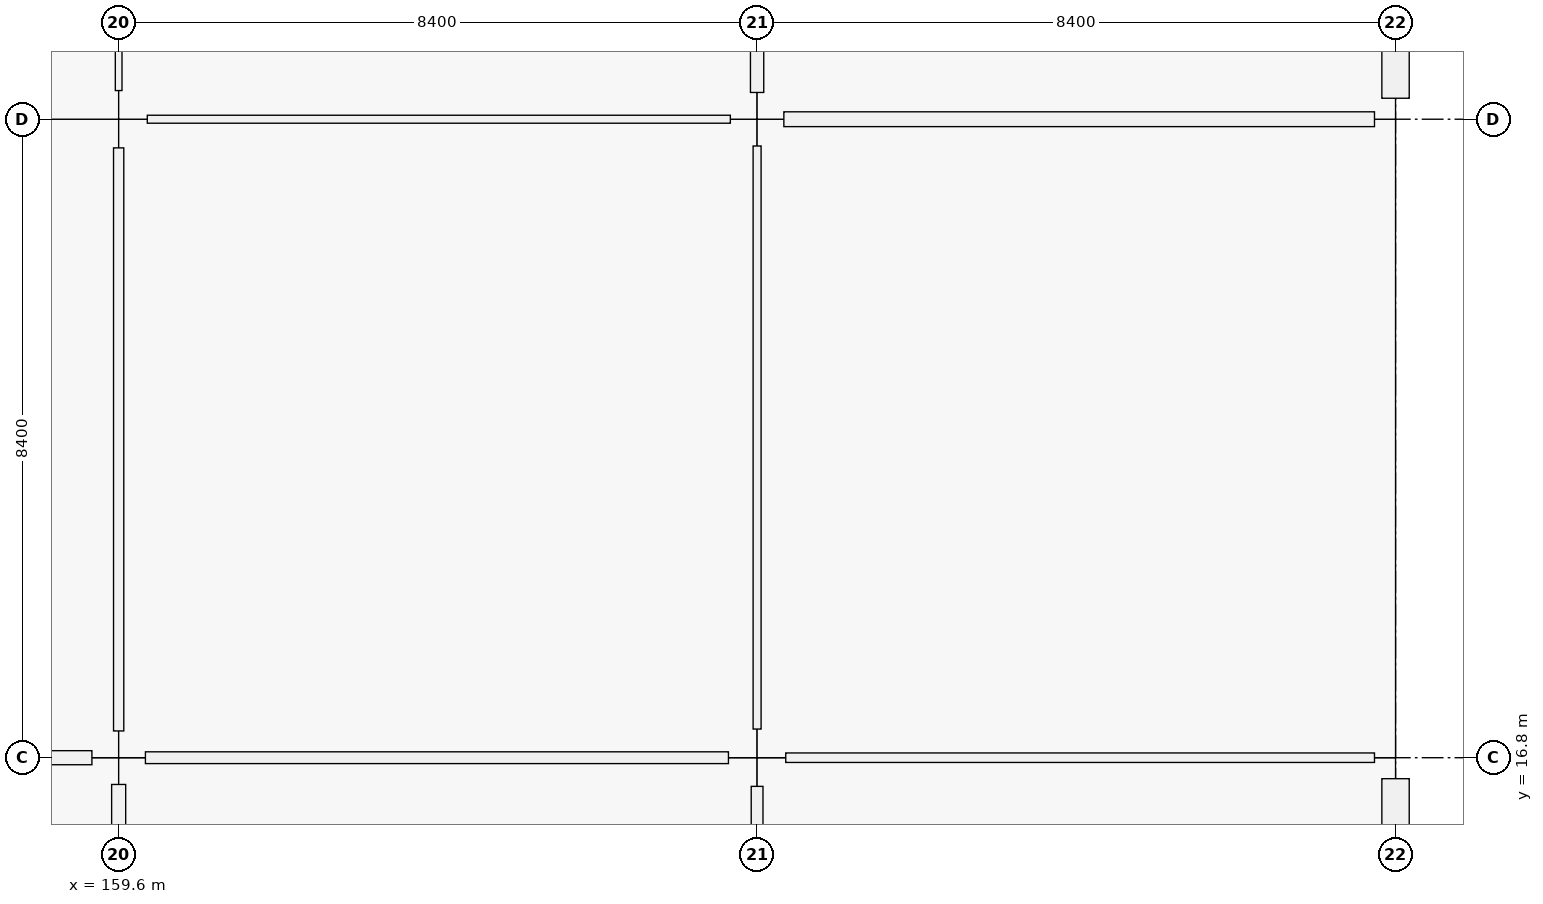
"""IFC4 building model, lengths in metres.
Left out: names, types, materials, properties, quantities, classifications, styles, units other than length and angle.
Written with IfcOpenShell. Run it as: python <this file> out.ifc"""

import sys

from ifc_helpers import new_model, si_unit, direction, frame, frame_2d, origin, origin_2d, place, context, subcontext, project, spatial, rectangle, extrude, element, fill, save


model = new_model("IFC4")
c1 = context("Model", 3, precision=1e-05, world=origin(), true_north=direction((0.0, 1.0)))
c2 = subcontext(c1, "Body", "Model", "MODEL_VIEW")
j1 = project(units=[si_unit("LENGTHUNIT", "METRE"), si_unit("PLANEANGLEUNIT", "RADIAN")], contexts=[c1])
p1 = place(None, origin())
s1 = spatial("IfcSite", under=j1, at=p1, CompositionType="ELEMENT")
p2 = place(p1, origin())
s2 = spatial("IfcBuilding", under=s1, at=p2, CompositionType="ELEMENT")
p3 = place(p2, frame((0.0, 0.0, 5.76)))
s3 = spatial("IfcBuildingStorey", under=s2, at=p3, CompositionType="ELEMENT", Elevation=5.76)
p4 = place(p3, frame((159.6, 16.8, 0.0), z_axis=(0.0, 0.0, 1.0), x_axis=(1.0, 0.0, 0.0)))
e1 = element("IfcColumn", 1, at=p4, inside=s3, PredefinedType="COLUMN", context=c2, shape_type="SweptSolid", body=[
    extrude(rectangle(XDim=0.7, YDim=0.7, at=origin_2d()), origin(), (0.0, 0.0, 1.0), 4.5),
])
for number, where, z_axis, x_axis in (
    (2, (159.6, 25.2, 0.0), (0.0, 0.0, 1.0), (1.0, 0.0, 0.0)),
    (3, (168.0, 16.8, 0.0), (0.0, 0.0, 1.0), (1.0, 0.0, 0.0)),
):
    element("IfcColumn", number, at=place(p3, frame(where, z_axis=z_axis, x_axis=x_axis)), inside=s3, PredefinedType="COLUMN", context=c2, shape_type="SweptSolid", body=[
        extrude(rectangle(XDim=0.75, YDim=0.75, at=origin_2d()), origin(), (0.0, 0.0, 1.0), 4.5),
    ])
p5 = place(p3, frame((168.0, 25.2, 0.0), z_axis=(0.0, 0.0, 1.0), x_axis=(1.0, 0.0, 0.0)))
e4 = element("IfcColumn", 4, at=p5, inside=s3, PredefinedType="COLUMN", context=c2, shape_type="SweptSolid", body=[
    extrude(rectangle(XDim=0.7, YDim=0.7, at=origin_2d()), origin(), (0.0, 0.0, 1.0), 4.5),
])
for number, where, z_axis, x_axis in (
    (5, (176.4, 16.8, 0.0), (0.0, 0.0, 1.0), (1.0, 0.0, 0.0)),
    (6, (176.4, 25.2, 0.0), (0.0, 0.0, 1.0), (1.0, 0.0, 0.0)),
):
    element("IfcColumn", number, at=place(p3, frame(where, z_axis=z_axis, x_axis=x_axis)), inside=s3, PredefinedType="COLUMN", context=c2, shape_type="SweptSolid", body=[
        extrude(rectangle(XDim=0.55, YDim=0.55, at=origin_2d()), origin(), (0.0, 0.0, 1.0), 4.2),
    ])
p6 = place(p3, frame((176.4, 16.524, 0.0), z_axis=(0.0, 0.0, 1.0), x_axis=(0.0, -1.0, 0.0)))
e7 = element("IfcWall", 7, at=p6, inside=s3, PredefinedType="SOLIDWALL", context=c2, shape_type="SweptSolid", body=[
    extrude(rectangle(XDim=7.848, YDim=0.36, at=frame_2d((3.924, 0.0))), origin(), (0.0, 0.0, 1.0), 3.4),
])
p7 = place(p6, frame((2.649, 0.0, 0.9)))
e8 = element("IfcOpeningElement", 8, at=p7, cuts=e7, PredefinedType="OPENING", context=c2, shape_type="SweptSolid", body=[
    extrude(rectangle(XDim=2.55, YDim=1.95, at=frame_2d((1.275, 0.975))), frame((0.0, 0.18, 0.0), z_axis=(0.0, -1.0, 0.0), x_axis=(1.0, 0.0, 0.0)), (0.0, 0.0, 1.0), 0.36),
])
p8 = place(p3, frame((176.4, 33.324, 0.0), z_axis=(0.0, 0.0, 1.0), x_axis=(0.0, -1.0, 0.0)))
e9 = element("IfcWall", 9, at=p8, inside=s3, PredefinedType="SOLIDWALL", context=c2, shape_type="SweptSolid", body=[
    extrude(rectangle(XDim=7.848, YDim=0.36, at=frame_2d((3.924, 0.0))), origin(), (0.0, 0.0, 1.0), 3.4),
])
p9 = place(p8, frame((3.274, 0.0, 0.9)))
e10 = element("IfcOpeningElement", 10, at=p9, cuts=e9, PredefinedType="OPENING", context=c2, shape_type="SweptSolid", body=[
    extrude(rectangle(XDim=1.3, YDim=1.95, at=frame_2d((0.65, 0.975))), frame((0.0, 0.18, 0.0), z_axis=(0.0, -1.0, 0.0), x_axis=(1.0, 0.0, 0.0)), (0.0, 0.0, 1.0), 0.36),
])
p10 = place(p3, frame((151.577, 16.8, 0.0), z_axis=(0.0, 0.0, 1.0), x_axis=(1.0, 0.0, 0.0)))
e11 = element("IfcWall", 11, at=p10, inside=s3, PredefinedType="PARTITIONING", context=c2, shape_type="SweptSolid", body=[
    extrude(rectangle(XDim=7.671, YDim=0.185, at=frame_2d((3.835, 0.0))), origin(), (0.0, 0.0, 1.0), 2.4),
])
p11 = place(p10, frame((3.356, 0.0, 0.0)))
e12 = element("IfcOpeningElement", 12, at=p11, cuts=e11, PredefinedType="OPENING", context=c2, shape_type="SweptSolid", body=[
    extrude(rectangle(XDim=0.96, YDim=2.18, at=frame_2d((0.48, 1.09))), frame((0.0, 0.093, 0.0), z_axis=(0.0, -1.0, 0.0), x_axis=(1.0, 0.0, 0.0)), (0.0, 0.0, 1.0), 0.185),
])
p12 = place(p3, frame((159.952, 16.8, 0.0), z_axis=(0.0, 0.0, 1.0), x_axis=(1.0, 0.0, 0.0)))
e13 = element("IfcWall", 13, at=p12, inside=s3, PredefinedType="PARTITIONING", context=c2, shape_type="SweptSolid", body=[
    extrude(rectangle(XDim=7.671, YDim=0.155, at=frame_2d((3.835, 0.0))), origin(), (0.0, 0.0, 1.0), 2.4),
])
p13 = place(p12, frame((3.325, 0.0, 0.0)))
e14 = element("IfcOpeningElement", 14, at=p13, cuts=e13, PredefinedType="OPENING", context=c2, shape_type="SweptSolid", body=[
    extrude(rectangle(XDim=1.02, YDim=2.2, at=frame_2d((0.51, 1.1))), frame((0.0, 0.078, 0.0), z_axis=(0.0, -1.0, 0.0), x_axis=(1.0, 0.0, 0.0)), (0.0, 0.0, 1.0), 0.155),
])
p14 = place(p3, frame((159.977, 25.2, 0.0), z_axis=(0.0, 0.0, 1.0), x_axis=(1.0, 0.0, 0.0)))
e15 = element("IfcWall", 15, at=p14, inside=s3, PredefinedType="PARTITIONING", context=c2, shape_type="SweptSolid", body=[
    extrude(rectangle(XDim=7.671, YDim=0.105, at=frame_2d((3.835, 0.0))), origin(), (0.0, 0.0, 1.0), 2.4),
])
p15 = place(p14, frame((3.331, 0.0, 0.0)))
e16 = element("IfcOpeningElement", 16, at=p15, cuts=e15, PredefinedType="OPENING", context=c2, shape_type="SweptSolid", body=[
    extrude(rectangle(XDim=1.01, YDim=2.12, at=frame_2d((0.505, 1.06))), frame((0.0, 0.052, 0.0), z_axis=(0.0, -1.0, 0.0), x_axis=(1.0, 0.0, 0.0)), (0.0, 0.0, 1.0), 0.105),
])
p16 = place(p3, frame((168.377, 16.8, 0.0), z_axis=(0.0, 0.0, 1.0), x_axis=(1.0, 0.0, 0.0)))
e17 = element("IfcWall", 17, at=p16, inside=s3, PredefinedType="PARTITIONING", context=c2, shape_type="SweptSolid", body=[
    extrude(rectangle(XDim=7.746, YDim=0.125, at=frame_2d((3.873, 0.0))), origin(), (0.0, 0.0, 1.0), 2.4),
])
p17 = place(p16, frame((3.343, 0.0, 0.0)))
e18 = element("IfcOpeningElement", 18, at=p17, cuts=e17, PredefinedType="OPENING", context=c2, shape_type="SweptSolid", body=[
    extrude(rectangle(XDim=1.06, YDim=2.22, at=frame_2d((0.53, 1.11))), frame((0.0, 0.062, 0.0), z_axis=(0.0, -1.0, 0.0), x_axis=(1.0, 0.0, 0.0)), (0.0, 0.0, 1.0), 0.125),
])
p18 = place(p3, frame((168.352, 25.2, 0.0), z_axis=(0.0, 0.0, 1.0), x_axis=(1.0, 0.0, 0.0)))
e19 = element("IfcWall", 19, at=p18, inside=s3, PredefinedType="PARTITIONING", context=c2, shape_type="SweptSolid", body=[
    extrude(rectangle(XDim=7.771, YDim=0.195, at=frame_2d((3.885, 0.0))), origin(), (0.0, 0.0, 1.0), 2.4),
])
p19 = place(p18, frame((3.385, 0.0, 0.0)))
e20 = element("IfcOpeningElement", 20, at=p19, cuts=e19, PredefinedType="OPENING", context=c2, shape_type="SweptSolid", body=[
    extrude(rectangle(XDim=1.0, YDim=2.2, at=frame_2d((0.5, 1.1))), frame((0.0, 0.098, 0.0), z_axis=(0.0, -1.0, 0.0), x_axis=(1.0, 0.0, 0.0)), (0.0, 0.0, 1.0), 0.195),
])
p20 = place(p3, frame((159.6, 8.727, 0.0), z_axis=(0.0, 0.0, 1.0), x_axis=(0.0, 1.0, 0.0)))
e21 = element("IfcWall", 21, at=p20, inside=s3, PredefinedType="PARTITIONING", context=c2, shape_type="SweptSolid", body=[
    extrude(rectangle(XDim=7.721, YDim=0.185, at=frame_2d((3.86, 0.0))), origin(), (0.0, 0.0, 1.0), 2.4),
])
p21 = place(p20, frame((3.33, 0.0, 0.0)))
e22 = element("IfcOpeningElement", 22, at=p21, cuts=e21, PredefinedType="OPENING", context=c2, shape_type="SweptSolid", body=[
    extrude(rectangle(XDim=1.06, YDim=2.22, at=frame_2d((0.53, 1.11))), frame((0.0, 0.093, 0.0), z_axis=(0.0, -1.0, 0.0), x_axis=(1.0, 0.0, 0.0)), (0.0, 0.0, 1.0), 0.185),
])
p22 = place(p3, frame((159.6, 17.152, 0.0), z_axis=(0.0, 0.0, 1.0), x_axis=(0.0, 1.0, 0.0)))
e23 = element("IfcWall", 23, at=p22, inside=s3, PredefinedType="PARTITIONING", context=c2, shape_type="SweptSolid", body=[
    extrude(rectangle(XDim=7.671, YDim=0.135, at=frame_2d((3.835, 0.0))), origin(), (0.0, 0.0, 1.0), 2.4),
])
p23 = place(p22, frame((3.331, 0.0, 0.0)))
e24 = element("IfcOpeningElement", 24, at=p23, cuts=e23, PredefinedType="OPENING", context=c2, shape_type="SweptSolid", body=[
    extrude(rectangle(XDim=1.01, YDim=2.12, at=frame_2d((0.505, 1.06))), frame((0.0, 0.067, 0.0), z_axis=(0.0, -1.0, 0.0), x_axis=(1.0, 0.0, 0.0)), (0.0, 0.0, 1.0), 0.135),
])
p24 = place(p3, frame((159.6, 25.577, 0.0), z_axis=(0.0, 0.0, 1.0), x_axis=(0.0, 1.0, 0.0)))
e25 = element("IfcWall", 25, at=p24, inside=s3, PredefinedType="PARTITIONING", context=c2, shape_type="SweptSolid", body=[
    extrude(rectangle(XDim=7.671, YDim=0.088, at=frame_2d((3.835, 0.0))), origin(), (0.0, 0.0, 1.0), 2.4),
])
p25 = place(p24, frame((3.376, 0.0, 0.0)))
e26 = element("IfcOpeningElement", 26, at=p25, cuts=e25, PredefinedType="OPENING", context=c2, shape_type="SweptSolid", body=[
    extrude(rectangle(XDim=0.92, YDim=2.15, at=frame_2d((0.46, 1.075))), frame((0.0, 0.044, 0.0), z_axis=(0.0, -1.0, 0.0), x_axis=(1.0, 0.0, 0.0)), (0.0, 0.0, 1.0), 0.088),
])
p26 = place(p3, frame((168.0, 8.702, 0.0), z_axis=(0.0, 0.0, 1.0), x_axis=(0.0, 1.0, 0.0)))
e27 = element("IfcWall", 27, at=p26, inside=s3, PredefinedType="PARTITIONING", context=c2, shape_type="SweptSolid", body=[
    extrude(rectangle(XDim=7.721, YDim=0.155, at=frame_2d((3.861, 0.0))), origin(), (0.0, 0.0, 1.0), 2.4),
])
p27 = place(p26, frame((3.37, 0.0, 0.0)))
e28 = element("IfcOpeningElement", 28, at=p27, cuts=e27, PredefinedType="OPENING", context=c2, shape_type="SweptSolid", body=[
    extrude(rectangle(XDim=0.98, YDim=2.18, at=frame_2d((0.49, 1.09))), frame((0.0, 0.078, 0.0), z_axis=(0.0, -1.0, 0.0), x_axis=(1.0, 0.0, 0.0)), (0.0, 0.0, 1.0), 0.155),
])
p28 = place(p3, frame((168.0, 17.177, 0.0), z_axis=(0.0, 0.0, 1.0), x_axis=(0.0, 1.0, 0.0)))
e29 = element("IfcWall", 29, at=p28, inside=s3, PredefinedType="PARTITIONING", context=c2, shape_type="SweptSolid", body=[
    extrude(rectangle(XDim=7.671, YDim=0.105, at=frame_2d((3.835, 0.0))), origin(), (0.0, 0.0, 1.0), 2.4),
])
p29 = place(p28, frame((3.356, 0.0, 0.0)))
e30 = element("IfcOpeningElement", 30, at=p29, cuts=e29, PredefinedType="OPENING", context=c2, shape_type="SweptSolid", body=[
    extrude(rectangle(XDim=0.96, YDim=2.18, at=frame_2d((0.48, 1.09))), frame((0.0, 0.052, 0.0), z_axis=(0.0, -1.0, 0.0), x_axis=(1.0, 0.0, 0.0)), (0.0, 0.0, 1.0), 0.105),
])
p30 = place(p3, frame((168.0, 25.552, 0.0), z_axis=(0.0, 0.0, 1.0), x_axis=(0.0, 1.0, 0.0)))
e31 = element("IfcWall", 31, at=p30, inside=s3, PredefinedType="PARTITIONING", context=c2, shape_type="SweptSolid", body=[
    extrude(rectangle(XDim=7.671, YDim=0.175, at=frame_2d((3.835, 0.0))), origin(), (0.0, 0.0, 1.0), 2.4),
])
p31 = place(p30, frame((3.351, 0.0, 0.0)))
e32 = element("IfcOpeningElement", 32, at=p31, cuts=e31, PredefinedType="OPENING", context=c2, shape_type="SweptSolid", body=[
    extrude(rectangle(XDim=0.97, YDim=2.12, at=frame_2d((0.485, 1.06))), frame((0.0, 0.087, 0.0), z_axis=(0.0, -1.0, 0.0), x_axis=(1.0, 0.0, 0.0)), (0.0, 0.0, 1.0), 0.175),
])
p32 = place(p15, origin())
e33 = element("IfcDoor", 33, at=p32, inside=s3, OperationType="SINGLE_SWING_LEFT", PredefinedType="DOOR", context=c2, shape_type="SweptSolid", body=[
    extrude(rectangle(XDim=1.01, YDim=2.12, at=frame_2d((0.505, 1.06))), frame((0.0, 0.025, 0.0), z_axis=(0.0, -1.0, 0.0), x_axis=(1.0, 0.0, 0.0)), (0.0, 0.0, 1.0), 0.05),
])
fill(e16, e33)
p33 = place(p17, origin())
e34 = element("IfcDoor", 34, at=p33, inside=s3, OperationType="SINGLE_SWING_RIGHT", PredefinedType="DOOR", context=c2, shape_type="SweptSolid", body=[
    extrude(rectangle(XDim=1.06, YDim=2.22, at=frame_2d((0.53, 1.11))), frame((0.0, 0.025, 0.0), z_axis=(0.0, -1.0, 0.0), x_axis=(1.0, 0.0, 0.0)), (0.0, 0.0, 1.0), 0.05),
])
fill(e18, e34)
p34 = place(p23, origin())
e35 = element("IfcDoor", 35, at=p34, inside=s3, OperationType="SINGLE_SWING_LEFT", PredefinedType="DOOR", context=c2, shape_type="SweptSolid", body=[
    extrude(rectangle(XDim=1.01, YDim=2.12, at=frame_2d((0.505, 1.06))), frame((0.0, 0.025, 0.0), z_axis=(0.0, -1.0, 0.0), x_axis=(1.0, 0.0, 0.0)), (0.0, 0.0, 1.0), 0.05),
])
fill(e24, e35)
p35 = place(p13, origin())
e36 = element("IfcDoor", 36, at=p35, inside=s3, OperationType="SINGLE_SWING_LEFT", PredefinedType="DOOR", context=c2, shape_type="SweptSolid", body=[
    extrude(rectangle(XDim=1.02, YDim=2.2, at=frame_2d((0.51, 1.1))), frame((0.0, 0.025, 0.0), z_axis=(0.0, -1.0, 0.0), x_axis=(1.0, 0.0, 0.0)), (0.0, 0.0, 1.0), 0.05),
])
fill(e14, e36)
p36 = place(p19, origin())
e37 = element("IfcDoor", 37, at=p36, inside=s3, OperationType="SINGLE_SWING_RIGHT", PredefinedType="DOOR", context=c2, shape_type="SweptSolid", body=[
    extrude(rectangle(XDim=1.0, YDim=2.2, at=frame_2d((0.5, 1.1))), frame((0.0, 0.025, 0.0), z_axis=(0.0, -1.0, 0.0), x_axis=(1.0, 0.0, 0.0)), (0.0, 0.0, 1.0), 0.05),
])
fill(e20, e37)
p37 = place(p29, origin())
e38 = element("IfcDoor", 38, at=p37, inside=s3, OperationType="SINGLE_SWING_LEFT", PredefinedType="DOOR", context=c2, shape_type="SweptSolid", body=[
    extrude(rectangle(XDim=0.96, YDim=2.18, at=frame_2d((0.48, 1.09))), frame((0.0, 0.025, 0.0), z_axis=(0.0, -1.0, 0.0), x_axis=(1.0, 0.0, 0.0)), (0.0, 0.0, 1.0), 0.05),
])
fill(e30, e38)
save(model, sys.argv[1])
